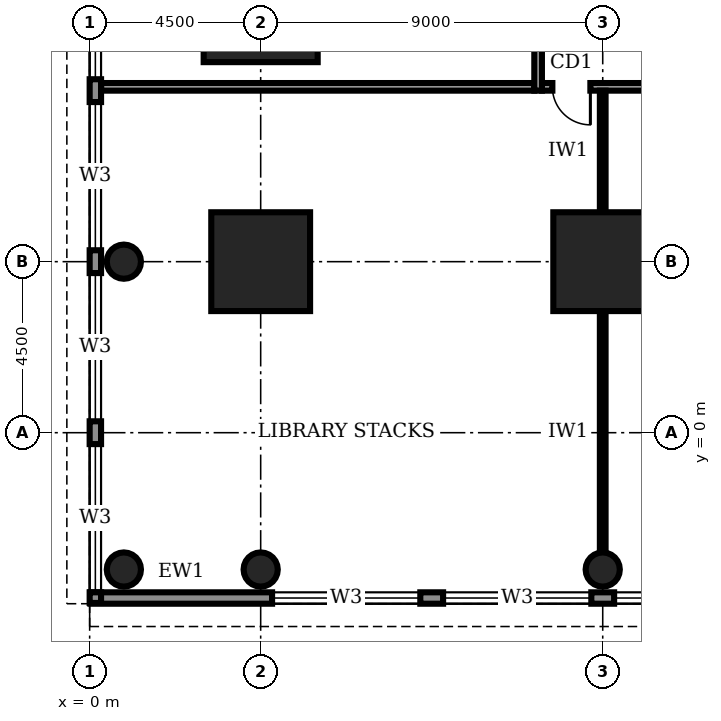
"""IFC4 building model, lengths in metres.
Left out: names, types, materials, properties, quantities, classifications, styles, units other than length and angle.
Written with IfcOpenShell. Run it as: python <this file> out.ifc"""

import sys

from ifc_helpers import new_model, si_unit, direction, frame, frame_2d, origin, origin_2d, place, context, subcontext, project, spatial, rectangle, circle, extrude, element, fill, save


model = new_model("IFC4")
c1 = context("Model", 3, precision=1e-05, world=origin(), true_north=direction((0.0, 1.0)))
c2 = subcontext(c1, "Body", "Model", "MODEL_VIEW")
j1 = project(units=[si_unit("LENGTHUNIT", "METRE"), si_unit("PLANEANGLEUNIT", "RADIAN")], contexts=[c1])
p1 = place(None, origin())
s1 = spatial("IfcSite", under=j1, at=p1, CompositionType="ELEMENT")
p2 = place(p1, origin())
s2 = spatial("IfcBuilding", under=s1, at=p2, CompositionType="ELEMENT")
p3 = place(p2, frame((0.0, 0.0, 16.0)))
s3 = spatial("IfcBuildingStorey", under=s2, at=p3, CompositionType="ELEMENT", Elevation=16.0)
for number, where, z_axis, x_axis in (
    (1, (4.5, 4.5, 0.0), (0.0, 0.0, 1.0), (1.0, 0.0, 0.0)),
    (2, (13.5, 4.5, 0.0), (0.0, 0.0, 1.0), (1.0, 0.0, 0.0)),
):
    element("IfcColumn", number, at=place(p3, frame(where, z_axis=z_axis, x_axis=x_axis)), inside=s3, PredefinedType="COLUMN", context=c2, shape_type="SweptSolid", body=[
        extrude(rectangle(XDim=2.6, YDim=2.6, at=origin_2d()), origin(), (0.0, 0.0, 1.0), 5.0),
    ])
p4 = place(p3, frame((4.5, 11.25, 0.0), z_axis=(0.0, 0.0, 1.0), x_axis=(1.0, 0.0, 0.0)))
e3 = element("IfcColumn", 3, at=p4, inside=s3, PredefinedType="COLUMN", context=c2, shape_type="SweptSolid", body=[
    extrude(rectangle(XDim=3.0, YDim=3.0, at=origin_2d()), origin(), (0.0, 0.0, 1.0), 5.0),
])
for number, where, z_axis, x_axis in (
    (4, (0.9, -3.6, 0.0), (0.0, 0.0, 1.0), (1.0, 0.0, 0.0)),
    (5, (4.5, -3.6, 0.0), (0.0, 0.0, 1.0), (1.0, 0.0, 0.0)),
    (6, (13.5, -3.6, 0.0), (0.0, 0.0, 1.0), (1.0, 0.0, 0.0)),
    (7, (0.9, 4.5, 0.0), (0.0, 0.0, 1.0), (1.0, 0.0, 0.0)),
):
    element("IfcColumn", number, at=place(p3, frame(where, z_axis=z_axis, x_axis=x_axis)), inside=s3, PredefinedType="COLUMN", context=c2, shape_type="SweptSolid", body=[
        extrude(circle(Radius=0.45, at=origin_2d()), origin(), (0.0, 0.0, 1.0), 5.0),
    ])
p5 = place(p3, frame((0.02, -4.35, 0.0), z_axis=(0.0, 0.0, 1.0), x_axis=(1.0, 0.0, 0.0)))
e8 = element("IfcWall", 8, at=p5, inside=s3, PredefinedType="STANDARD", context=c2, shape_type="SweptSolid", body=[
    extrude(rectangle(XDim=98.96, YDim=0.3, at=frame_2d((49.48, 0.0))), origin(), (0.0, 0.0, 1.0), 4.7),
])
p6 = place(p5, frame((4.78, 0.0, 0.95)))
e9 = element("IfcOpeningElement", 9, at=p6, cuts=e8, PredefinedType="OPENING", context=c2, shape_type="SweptSolid", body=[
    extrude(rectangle(XDim=3.9, YDim=1.8, at=frame_2d((1.95, 0.9))), frame((0.0, 0.16, 0.0), z_axis=(0.0, -1.0, 0.0), x_axis=(1.0, 0.0, 0.0)), (0.0, 0.0, 1.0), 0.32),
])
p7 = place(p5, frame((9.28, 0.0, 0.95)))
e10 = element("IfcOpeningElement", 10, at=p7, cuts=e8, PredefinedType="OPENING", context=c2, shape_type="SweptSolid", body=[
    extrude(rectangle(XDim=3.9, YDim=1.8, at=frame_2d((1.95, 0.9))), frame((0.0, 0.16, 0.0), z_axis=(0.0, -1.0, 0.0), x_axis=(1.0, 0.0, 0.0)), (0.0, 0.0, 1.0), 0.32),
])
p8 = place(p5, frame((13.78, 0.0, 0.95)))
e11 = element("IfcOpeningElement", 11, at=p8, cuts=e8, PredefinedType="OPENING", context=c2, shape_type="SweptSolid", body=[
    extrude(rectangle(XDim=3.9, YDim=1.8, at=frame_2d((1.95, 0.9))), frame((0.0, 0.16, 0.0), z_axis=(0.0, -1.0, 0.0), x_axis=(1.0, 0.0, 0.0)), (0.0, 0.0, 1.0), 0.32),
])
p9 = place(p5, frame((18.28, 0.0, 0.95)))
e12 = element("IfcOpeningElement", 12, at=p9, cuts=e8, PredefinedType="OPENING", context=c2, shape_type="SweptSolid", body=[
    extrude(rectangle(XDim=3.9, YDim=1.8, at=frame_2d((1.95, 0.9))), frame((0.0, 0.16, 0.0), z_axis=(0.0, -1.0, 0.0), x_axis=(1.0, 0.0, 0.0)), (0.0, 0.0, 1.0), 0.32),
])
p10 = place(p5, frame((22.78, 0.0, 0.95)))
e13 = element("IfcOpeningElement", 13, at=p10, cuts=e8, PredefinedType="OPENING", context=c2, shape_type="SweptSolid", body=[
    extrude(rectangle(XDim=3.9, YDim=1.8, at=frame_2d((1.95, 0.9))), frame((0.0, 0.16, 0.0), z_axis=(0.0, -1.0, 0.0), x_axis=(1.0, 0.0, 0.0)), (0.0, 0.0, 1.0), 0.32),
])
p11 = place(p5, frame((27.28, 0.0, 0.95)))
e14 = element("IfcOpeningElement", 14, at=p11, cuts=e8, PredefinedType="OPENING", context=c2, shape_type="SweptSolid", body=[
    extrude(rectangle(XDim=3.9, YDim=1.8, at=frame_2d((1.95, 0.9))), frame((0.0, 0.16, 0.0), z_axis=(0.0, -1.0, 0.0), x_axis=(1.0, 0.0, 0.0)), (0.0, 0.0, 1.0), 0.32),
])
p12 = place(p5, frame((31.78, 0.0, 0.95)))
e15 = element("IfcOpeningElement", 15, at=p12, cuts=e8, PredefinedType="OPENING", context=c2, shape_type="SweptSolid", body=[
    extrude(rectangle(XDim=3.9, YDim=1.8, at=frame_2d((1.95, 0.9))), frame((0.0, 0.16, 0.0), z_axis=(0.0, -1.0, 0.0), x_axis=(1.0, 0.0, 0.0)), (0.0, 0.0, 1.0), 0.32),
])
p13 = place(p5, frame((36.28, 0.0, 0.95)))
e16 = element("IfcOpeningElement", 16, at=p13, cuts=e8, PredefinedType="OPENING", context=c2, shape_type="SweptSolid", body=[
    extrude(rectangle(XDim=3.9, YDim=1.8, at=frame_2d((1.95, 0.9))), frame((0.0, 0.16, 0.0), z_axis=(0.0, -1.0, 0.0), x_axis=(1.0, 0.0, 0.0)), (0.0, 0.0, 1.0), 0.32),
])
p14 = place(p5, frame((40.78, 0.0, 0.95)))
e17 = element("IfcOpeningElement", 17, at=p14, cuts=e8, PredefinedType="OPENING", context=c2, shape_type="SweptSolid", body=[
    extrude(rectangle(XDim=3.9, YDim=1.8, at=frame_2d((1.95, 0.9))), frame((0.0, 0.16, 0.0), z_axis=(0.0, -1.0, 0.0), x_axis=(1.0, 0.0, 0.0)), (0.0, 0.0, 1.0), 0.32),
])
p15 = place(p5, frame((45.28, 0.0, 0.95)))
e18 = element("IfcOpeningElement", 18, at=p15, cuts=e8, PredefinedType="OPENING", context=c2, shape_type="SweptSolid", body=[
    extrude(rectangle(XDim=3.9, YDim=1.8, at=frame_2d((1.95, 0.9))), frame((0.0, 0.16, 0.0), z_axis=(0.0, -1.0, 0.0), x_axis=(1.0, 0.0, 0.0)), (0.0, 0.0, 1.0), 0.32),
])
p16 = place(p5, frame((49.78, 0.0, 0.95)))
e19 = element("IfcOpeningElement", 19, at=p16, cuts=e8, PredefinedType="OPENING", context=c2, shape_type="SweptSolid", body=[
    extrude(rectangle(XDim=3.9, YDim=1.8, at=frame_2d((1.95, 0.9))), frame((0.0, 0.16, 0.0), z_axis=(0.0, -1.0, 0.0), x_axis=(1.0, 0.0, 0.0)), (0.0, 0.0, 1.0), 0.32),
])
p17 = place(p5, frame((54.28, 0.0, 0.95)))
e20 = element("IfcOpeningElement", 20, at=p17, cuts=e8, PredefinedType="OPENING", context=c2, shape_type="SweptSolid", body=[
    extrude(rectangle(XDim=3.9, YDim=1.8, at=frame_2d((1.95, 0.9))), frame((0.0, 0.16, 0.0), z_axis=(0.0, -1.0, 0.0), x_axis=(1.0, 0.0, 0.0)), (0.0, 0.0, 1.0), 0.32),
])
p18 = place(p5, frame((58.78, 0.0, 0.95)))
e21 = element("IfcOpeningElement", 21, at=p18, cuts=e8, PredefinedType="OPENING", context=c2, shape_type="SweptSolid", body=[
    extrude(rectangle(XDim=3.9, YDim=1.8, at=frame_2d((1.95, 0.9))), frame((0.0, 0.16, 0.0), z_axis=(0.0, -1.0, 0.0), x_axis=(1.0, 0.0, 0.0)), (0.0, 0.0, 1.0), 0.32),
])
p19 = place(p5, frame((63.28, 0.0, 0.95)))
e22 = element("IfcOpeningElement", 22, at=p19, cuts=e8, PredefinedType="OPENING", context=c2, shape_type="SweptSolid", body=[
    extrude(rectangle(XDim=3.9, YDim=1.8, at=frame_2d((1.95, 0.9))), frame((0.0, 0.16, 0.0), z_axis=(0.0, -1.0, 0.0), x_axis=(1.0, 0.0, 0.0)), (0.0, 0.0, 1.0), 0.32),
])
p20 = place(p5, frame((67.78, 0.0, 0.95)))
e23 = element("IfcOpeningElement", 23, at=p20, cuts=e8, PredefinedType="OPENING", context=c2, shape_type="SweptSolid", body=[
    extrude(rectangle(XDim=3.9, YDim=1.8, at=frame_2d((1.95, 0.9))), frame((0.0, 0.16, 0.0), z_axis=(0.0, -1.0, 0.0), x_axis=(1.0, 0.0, 0.0)), (0.0, 0.0, 1.0), 0.32),
])
p21 = place(p5, frame((72.28, 0.0, 0.95)))
e24 = element("IfcOpeningElement", 24, at=p21, cuts=e8, PredefinedType="OPENING", context=c2, shape_type="SweptSolid", body=[
    extrude(rectangle(XDim=3.9, YDim=1.8, at=frame_2d((1.95, 0.9))), frame((0.0, 0.16, 0.0), z_axis=(0.0, -1.0, 0.0), x_axis=(1.0, 0.0, 0.0)), (0.0, 0.0, 1.0), 0.32),
])
p22 = place(p5, frame((76.78, 0.0, 0.95)))
e25 = element("IfcOpeningElement", 25, at=p22, cuts=e8, PredefinedType="OPENING", context=c2, shape_type="SweptSolid", body=[
    extrude(rectangle(XDim=3.9, YDim=1.8, at=frame_2d((1.95, 0.9))), frame((0.0, 0.16, 0.0), z_axis=(0.0, -1.0, 0.0), x_axis=(1.0, 0.0, 0.0)), (0.0, 0.0, 1.0), 0.32),
])
p23 = place(p5, frame((81.28, 0.0, 0.95)))
e26 = element("IfcOpeningElement", 26, at=p23, cuts=e8, PredefinedType="OPENING", context=c2, shape_type="SweptSolid", body=[
    extrude(rectangle(XDim=3.9, YDim=1.8, at=frame_2d((1.95, 0.9))), frame((0.0, 0.16, 0.0), z_axis=(0.0, -1.0, 0.0), x_axis=(1.0, 0.0, 0.0)), (0.0, 0.0, 1.0), 0.32),
])
p24 = place(p5, frame((85.78, 0.0, 0.95)))
e27 = element("IfcOpeningElement", 27, at=p24, cuts=e8, PredefinedType="OPENING", context=c2, shape_type="SweptSolid", body=[
    extrude(rectangle(XDim=3.9, YDim=1.8, at=frame_2d((1.95, 0.9))), frame((0.0, 0.16, 0.0), z_axis=(0.0, -1.0, 0.0), x_axis=(1.0, 0.0, 0.0)), (0.0, 0.0, 1.0), 0.32),
])
p25 = place(p5, frame((90.28, 0.0, 0.95)))
e28 = element("IfcOpeningElement", 28, at=p25, cuts=e8, PredefinedType="OPENING", context=c2, shape_type="SweptSolid", body=[
    extrude(rectangle(XDim=3.9, YDim=1.8, at=frame_2d((1.95, 0.9))), frame((0.0, 0.16, 0.0), z_axis=(0.0, -1.0, 0.0), x_axis=(1.0, 0.0, 0.0)), (0.0, 0.0, 1.0), 0.32),
])
p26 = place(p5, frame((94.78, 0.0, 0.95)))
e29 = element("IfcOpeningElement", 29, at=p26, cuts=e8, PredefinedType="OPENING", context=c2, shape_type="SweptSolid", body=[
    extrude(rectangle(XDim=3.9, YDim=1.8, at=frame_2d((1.95, 0.9))), frame((0.0, 0.16, 0.0), z_axis=(0.0, -1.0, 0.0), x_axis=(1.0, 0.0, 0.0)), (0.0, 0.0, 1.0), 0.32),
])
p27 = place(p3, frame((0.15, 49.48, 0.0), z_axis=(0.0, 0.0, 1.0), x_axis=(0.0, -1.0, 0.0)))
e30 = element("IfcWall", 30, at=p27, inside=s3, PredefinedType="STANDARD", context=c2, shape_type="SweptSolid", body=[
    extrude(rectangle(XDim=53.96, YDim=0.3, at=frame_2d((26.98, 0.0))), origin(), (0.0, 0.0, 1.0), 4.7),
])
p28 = place(p27, frame((49.78, 0.0, 0.95)))
e31 = element("IfcOpeningElement", 31, at=p28, cuts=e30, PredefinedType="OPENING", context=c2, shape_type="SweptSolid", body=[
    extrude(rectangle(XDim=3.9, YDim=1.8, at=frame_2d((1.95, 0.9))), frame((0.0, 0.16, 0.0), z_axis=(0.0, -1.0, 0.0), x_axis=(1.0, 0.0, 0.0)), (0.0, 0.0, 1.0), 0.32),
])
p29 = place(p27, frame((45.28, 0.0, 0.95)))
e32 = element("IfcOpeningElement", 32, at=p29, cuts=e30, PredefinedType="OPENING", context=c2, shape_type="SweptSolid", body=[
    extrude(rectangle(XDim=3.9, YDim=1.8, at=frame_2d((1.95, 0.9))), frame((0.0, 0.16, 0.0), z_axis=(0.0, -1.0, 0.0), x_axis=(1.0, 0.0, 0.0)), (0.0, 0.0, 1.0), 0.32),
])
p30 = place(p27, frame((40.78, 0.0, 0.95)))
e33 = element("IfcOpeningElement", 33, at=p30, cuts=e30, PredefinedType="OPENING", context=c2, shape_type="SweptSolid", body=[
    extrude(rectangle(XDim=3.9, YDim=1.8, at=frame_2d((1.95, 0.9))), frame((0.0, 0.16, 0.0), z_axis=(0.0, -1.0, 0.0), x_axis=(1.0, 0.0, 0.0)), (0.0, 0.0, 1.0), 0.32),
])
p31 = place(p27, frame((36.28, 0.0, 0.95)))
e34 = element("IfcOpeningElement", 34, at=p31, cuts=e30, PredefinedType="OPENING", context=c2, shape_type="SweptSolid", body=[
    extrude(rectangle(XDim=3.9, YDim=1.8, at=frame_2d((1.95, 0.9))), frame((0.0, 0.16, 0.0), z_axis=(0.0, -1.0, 0.0), x_axis=(1.0, 0.0, 0.0)), (0.0, 0.0, 1.0), 0.32),
])
p32 = place(p27, frame((31.78, 0.0, 0.95)))
e35 = element("IfcOpeningElement", 35, at=p32, cuts=e30, PredefinedType="OPENING", context=c2, shape_type="SweptSolid", body=[
    extrude(rectangle(XDim=3.9, YDim=1.8, at=frame_2d((1.95, 0.9))), frame((0.0, 0.16, 0.0), z_axis=(0.0, -1.0, 0.0), x_axis=(1.0, 0.0, 0.0)), (0.0, 0.0, 1.0), 0.32),
])
p33 = place(p27, frame((27.28, 0.0, 0.95)))
e36 = element("IfcOpeningElement", 36, at=p33, cuts=e30, PredefinedType="OPENING", context=c2, shape_type="SweptSolid", body=[
    extrude(rectangle(XDim=3.9, YDim=1.8, at=frame_2d((1.95, 0.9))), frame((0.0, 0.16, 0.0), z_axis=(0.0, -1.0, 0.0), x_axis=(1.0, 0.0, 0.0)), (0.0, 0.0, 1.0), 0.32),
])
p34 = place(p27, frame((22.78, 0.0, 0.95)))
e37 = element("IfcOpeningElement", 37, at=p34, cuts=e30, PredefinedType="OPENING", context=c2, shape_type="SweptSolid", body=[
    extrude(rectangle(XDim=3.9, YDim=1.8, at=frame_2d((1.95, 0.9))), frame((0.0, 0.16, 0.0), z_axis=(0.0, -1.0, 0.0), x_axis=(1.0, 0.0, 0.0)), (0.0, 0.0, 1.0), 0.32),
])
p35 = place(p27, frame((18.28, 0.0, 0.95)))
e38 = element("IfcOpeningElement", 38, at=p35, cuts=e30, PredefinedType="OPENING", context=c2, shape_type="SweptSolid", body=[
    extrude(rectangle(XDim=3.9, YDim=1.8, at=frame_2d((1.95, 0.9))), frame((0.0, 0.16, 0.0), z_axis=(0.0, -1.0, 0.0), x_axis=(1.0, 0.0, 0.0)), (0.0, 0.0, 1.0), 0.32),
])
p36 = place(p27, frame((13.78, 0.0, 0.95)))
e39 = element("IfcOpeningElement", 39, at=p36, cuts=e30, PredefinedType="OPENING", context=c2, shape_type="SweptSolid", body=[
    extrude(rectangle(XDim=3.9, YDim=1.8, at=frame_2d((1.95, 0.9))), frame((0.0, 0.16, 0.0), z_axis=(0.0, -1.0, 0.0), x_axis=(1.0, 0.0, 0.0)), (0.0, 0.0, 1.0), 0.32),
])
p37 = place(p27, frame((9.28, 0.0, 0.95)))
e40 = element("IfcOpeningElement", 40, at=p37, cuts=e30, PredefinedType="OPENING", context=c2, shape_type="SweptSolid", body=[
    extrude(rectangle(XDim=3.9, YDim=1.8, at=frame_2d((1.95, 0.9))), frame((0.0, 0.16, 0.0), z_axis=(0.0, -1.0, 0.0), x_axis=(1.0, 0.0, 0.0)), (0.0, 0.0, 1.0), 0.32),
])
p38 = place(p27, frame((4.78, 0.0, 0.95)))
e41 = element("IfcOpeningElement", 41, at=p38, cuts=e30, PredefinedType="OPENING", context=c2, shape_type="SweptSolid", body=[
    extrude(rectangle(XDim=3.9, YDim=1.8, at=frame_2d((1.95, 0.9))), frame((0.0, 0.16, 0.0), z_axis=(0.0, -1.0, 0.0), x_axis=(1.0, 0.0, 0.0)), (0.0, 0.0, 1.0), 0.32),
])
p39 = place(p3, frame((11.9, 9.1, 0.0), z_axis=(0.0, 0.0, 1.0), x_axis=(1.0, 0.0, 0.0)))
e42 = element("IfcWall", 42, at=p39, inside=s3, PredefinedType="SOLIDWALL", context=c2, shape_type="SweptSolid", body=[
    extrude(rectangle(XDim=16.9, YDim=0.2, at=frame_2d((8.45, 0.0))), origin(), (0.0, 0.0, 1.0), 4.7),
])
p40 = place(p39, frame((0.275, 0.0, 0.0)))
e43 = element("IfcOpeningElement", 43, at=p40, cuts=e42, PredefinedType="OPENING", context=c2, shape_type="SweptSolid", body=[
    extrude(rectangle(XDim=1.0, YDim=2.1, at=frame_2d((0.5, 1.05))), frame((0.0, 0.11, 0.0), z_axis=(0.0, -1.0, 0.0), x_axis=(1.0, 0.0, 0.0)), (0.0, 0.0, 1.0), 0.22),
])
p41 = place(p39, frame((3.35, 0.0, 0.0)))
e44 = element("IfcOpeningElement", 44, at=p41, cuts=e42, PredefinedType="OPENING", context=c2, shape_type="SweptSolid", body=[
    extrude(rectangle(XDim=1.0, YDim=2.1, at=frame_2d((0.5, 1.05))), frame((0.0, 0.11, 0.0), z_axis=(0.0, -1.0, 0.0), x_axis=(1.0, 0.0, 0.0)), (0.0, 0.0, 1.0), 0.22),
])
p42 = place(p39, frame((9.7, 0.0, 0.0)))
e45 = element("IfcOpeningElement", 45, at=p42, cuts=e42, PredefinedType="OPENING", context=c2, shape_type="SweptSolid", body=[
    extrude(rectangle(XDim=1.8, YDim=2.1, at=frame_2d((0.9, 1.05))), frame((0.0, 0.11, 0.0), z_axis=(0.0, -1.0, 0.0), x_axis=(1.0, 0.0, 0.0)), (0.0, 0.0, 1.0), 0.22),
])
p43 = place(p39, frame((15.425, 0.0, 0.0)))
e46 = element("IfcOpeningElement", 46, at=p43, cuts=e42, PredefinedType="OPENING", context=c2, shape_type="SweptSolid", body=[
    extrude(rectangle(XDim=1.0, YDim=2.1, at=frame_2d((0.5, 1.05))), frame((0.0, 0.11, 0.0), z_axis=(0.0, -1.0, 0.0), x_axis=(1.0, 0.0, 0.0)), (0.0, 0.0, 1.0), 0.22),
])
p44 = place(p3, frame((11.8, 31.3, 0.0), z_axis=(0.0, 0.0, 1.0), x_axis=(0.0, -1.0, 0.0)))
e47 = element("IfcWall", 47, at=p44, inside=s3, PredefinedType="SOLIDWALL", context=c2, shape_type="SweptSolid", body=[
    extrude(rectangle(XDim=22.3, YDim=0.2, at=frame_2d((11.15, 0.0))), origin(), (0.0, 0.0, 1.0), 4.7),
])
p45 = place(p44, frame((19.55, 0.0, 0.0)))
e48 = element("IfcOpeningElement", 48, at=p45, cuts=e47, PredefinedType="OPENING", context=c2, shape_type="SweptSolid", body=[
    extrude(rectangle(XDim=1.0, YDim=2.1, at=frame_2d((0.5, 1.05))), frame((0.0, 0.11, 0.0), z_axis=(0.0, -1.0, 0.0), x_axis=(1.0, 0.0, 0.0)), (0.0, 0.0, 1.0), 0.22),
])
p46 = place(p44, frame((15.45, 0.0, 0.0)))
e49 = element("IfcOpeningElement", 49, at=p46, cuts=e47, PredefinedType="OPENING", context=c2, shape_type="SweptSolid", body=[
    extrude(rectangle(XDim=0.9, YDim=2.1, at=frame_2d((0.45, 1.05))), frame((0.0, 0.11, 0.0), z_axis=(0.0, -1.0, 0.0), x_axis=(1.0, 0.0, 0.0)), (0.0, 0.0, 1.0), 0.22),
])
p47 = place(p44, frame((12.45, 0.0, 0.0)))
e50 = element("IfcOpeningElement", 50, at=p47, cuts=e47, PredefinedType="OPENING", context=c2, shape_type="SweptSolid", body=[
    extrude(rectangle(XDim=0.9, YDim=2.1, at=frame_2d((0.45, 1.05))), frame((0.0, 0.11, 0.0), z_axis=(0.0, -1.0, 0.0), x_axis=(1.0, 0.0, 0.0)), (0.0, 0.0, 1.0), 0.22),
])
p48 = place(p44, frame((7.6, 0.0, 0.0)))
e51 = element("IfcOpeningElement", 51, at=p48, cuts=e47, PredefinedType="OPENING", context=c2, shape_type="SweptSolid", body=[
    extrude(rectangle(XDim=0.9, YDim=2.1, at=frame_2d((0.45, 1.05))), frame((0.0, 0.11, 0.0), z_axis=(0.0, -1.0, 0.0), x_axis=(1.0, 0.0, 0.0)), (0.0, 0.0, 1.0), 0.22),
])
p49 = place(p44, frame((4.8, 0.0, 0.0)))
e52 = element("IfcOpeningElement", 52, at=p49, cuts=e47, PredefinedType="OPENING", context=c2, shape_type="SweptSolid", body=[
    extrude(rectangle(XDim=1.0, YDim=2.1, at=frame_2d((0.5, 1.05))), frame((0.0, 0.11, 0.0), z_axis=(0.0, -1.0, 0.0), x_axis=(1.0, 0.0, 0.0)), (0.0, 0.0, 1.0), 0.22),
])
p50 = place(p44, frame((10.3, 0.0, 0.0)))
e53 = element("IfcOpeningElement", 53, at=p50, cuts=e47, PredefinedType="OPENING", context=c2, shape_type="SweptSolid", body=[
    extrude(rectangle(XDim=1.0, YDim=2.1, at=frame_2d((0.5, 1.05))), frame((0.0, 0.11, 0.0), z_axis=(0.0, -1.0, 0.0), x_axis=(1.0, 0.0, 0.0)), (0.0, 0.0, 1.0), 0.22),
])
p51 = place(p44, frame((1.55, 0.0, 0.0)))
e54 = element("IfcOpeningElement", 54, at=p51, cuts=e47, PredefinedType="OPENING", context=c2, shape_type="SweptSolid", body=[
    extrude(rectangle(XDim=1.0, YDim=2.1, at=frame_2d((0.5, 1.05))), frame((0.0, 0.11, 0.0), z_axis=(0.0, -1.0, 0.0), x_axis=(1.0, 0.0, 0.0)), (0.0, 0.0, 1.0), 0.22),
])
p52 = place(p3, frame((0.3, 9.1, 0.0), z_axis=(0.0, 0.0, 1.0), x_axis=(1.0, 0.0, 0.0)))
e55 = element("IfcWall", 55, at=p52, inside=s3, PredefinedType="SOLIDWALL", context=c2, shape_type="SweptSolid", body=[
    extrude(rectangle(XDim=11.4, YDim=0.2, at=frame_2d((5.7, 0.0))), origin(), (0.0, 0.0, 1.0), 4.7),
])
p53 = place(p3, frame((13.5, -3.13, 0.0), z_axis=(0.0, 0.0, 1.0), x_axis=(0.0, 1.0, 0.0)))
e56 = element("IfcWall", 56, at=p53, inside=s3, PredefinedType="PARTITIONING", context=c2, shape_type="SweptSolid", body=[
    extrude(rectangle(XDim=6.31, YDim=0.15, at=frame_2d((3.155, 0.0))), origin(), (0.0, 0.0, 1.0), 3.7),
])
p54 = place(p3, frame((13.5, 5.82, 0.0), z_axis=(0.0, 0.0, 1.0), x_axis=(0.0, 1.0, 0.0)))
e57 = element("IfcWall", 57, at=p54, inside=s3, PredefinedType="PARTITIONING", context=c2, shape_type="SweptSolid", body=[
    extrude(rectangle(XDim=3.18, YDim=0.15, at=frame_2d((1.59, 0.0))), origin(), (0.0, 0.0, 1.0), 3.8),
])
p55 = place(p6, origin())
e58 = element("IfcWindow", 58, at=p55, inside=s3, PartitioningType="SINGLE_PANEL", PredefinedType="WINDOW", context=c2, shape_type="SweptSolid", body=[
    extrude(rectangle(XDim=3.9, YDim=1.8, at=frame_2d((1.95, 0.9))), frame((0.0, 0.03, 0.0), z_axis=(0.0, -1.0, 0.0), x_axis=(1.0, 0.0, 0.0)), (0.0, 0.0, 1.0), 0.06),
])
fill(e9, e58)
p56 = place(p7, origin())
e59 = element("IfcWindow", 59, at=p56, inside=s3, PartitioningType="SINGLE_PANEL", PredefinedType="WINDOW", context=c2, shape_type="SweptSolid", body=[
    extrude(rectangle(XDim=3.9, YDim=1.8, at=frame_2d((1.95, 0.9))), frame((0.0, 0.03, 0.0), z_axis=(0.0, -1.0, 0.0), x_axis=(1.0, 0.0, 0.0)), (0.0, 0.0, 1.0), 0.06),
])
fill(e10, e59)
p57 = place(p8, origin())
e60 = element("IfcWindow", 60, at=p57, inside=s3, PartitioningType="SINGLE_PANEL", PredefinedType="WINDOW", context=c2, shape_type="SweptSolid", body=[
    extrude(rectangle(XDim=3.9, YDim=1.8, at=frame_2d((1.95, 0.9))), frame((0.0, 0.03, 0.0), z_axis=(0.0, -1.0, 0.0), x_axis=(1.0, 0.0, 0.0)), (0.0, 0.0, 1.0), 0.06),
])
fill(e11, e60)
p58 = place(p28, origin())
e61 = element("IfcWindow", 61, at=p58, inside=s3, PartitioningType="SINGLE_PANEL", PredefinedType="WINDOW", context=c2, shape_type="SweptSolid", body=[
    extrude(rectangle(XDim=3.9, YDim=1.8, at=frame_2d((1.95, 0.9))), frame((0.0, 0.03, 0.0), z_axis=(0.0, -1.0, 0.0), x_axis=(1.0, 0.0, 0.0)), (0.0, 0.0, 1.0), 0.06),
])
fill(e31, e61)
p59 = place(p29, origin())
e62 = element("IfcWindow", 62, at=p59, inside=s3, PartitioningType="SINGLE_PANEL", PredefinedType="WINDOW", context=c2, shape_type="SweptSolid", body=[
    extrude(rectangle(XDim=3.9, YDim=1.8, at=frame_2d((1.95, 0.9))), frame((0.0, 0.03, 0.0), z_axis=(0.0, -1.0, 0.0), x_axis=(1.0, 0.0, 0.0)), (0.0, 0.0, 1.0), 0.06),
])
fill(e32, e62)
p60 = place(p30, origin())
e63 = element("IfcWindow", 63, at=p60, inside=s3, PartitioningType="SINGLE_PANEL", PredefinedType="WINDOW", context=c2, shape_type="SweptSolid", body=[
    extrude(rectangle(XDim=3.9, YDim=1.8, at=frame_2d((1.95, 0.9))), frame((0.0, 0.03, 0.0), z_axis=(0.0, -1.0, 0.0), x_axis=(1.0, 0.0, 0.0)), (0.0, 0.0, 1.0), 0.06),
])
fill(e33, e63)
p61 = place(p31, origin())
e64 = element("IfcWindow", 64, at=p61, inside=s3, PartitioningType="SINGLE_PANEL", PredefinedType="WINDOW", context=c2, shape_type="SweptSolid", body=[
    extrude(rectangle(XDim=3.9, YDim=1.8, at=frame_2d((1.95, 0.9))), frame((0.0, 0.03, 0.0), z_axis=(0.0, -1.0, 0.0), x_axis=(1.0, 0.0, 0.0)), (0.0, 0.0, 1.0), 0.06),
])
fill(e34, e64)
p62 = place(p40, frame((1.0, 0.0, 0.0), z_axis=(0.0, 0.0, 1.0), x_axis=(-1.0, 0.0, 0.0)))
e65 = element("IfcDoor", 65, at=p62, inside=s3, OperationType="SINGLE_SWING_LEFT", PredefinedType="DOOR", context=c2, shape_type="SweptSolid", body=[
    extrude(rectangle(XDim=1.0, YDim=2.1, at=frame_2d((0.5, 1.05))), frame((0.0, 0.025, 0.0), z_axis=(0.0, -1.0, 0.0), x_axis=(1.0, 0.0, 0.0)), (0.0, 0.0, 1.0), 0.05),
])
fill(e43, e65)
save(model, sys.argv[1])
